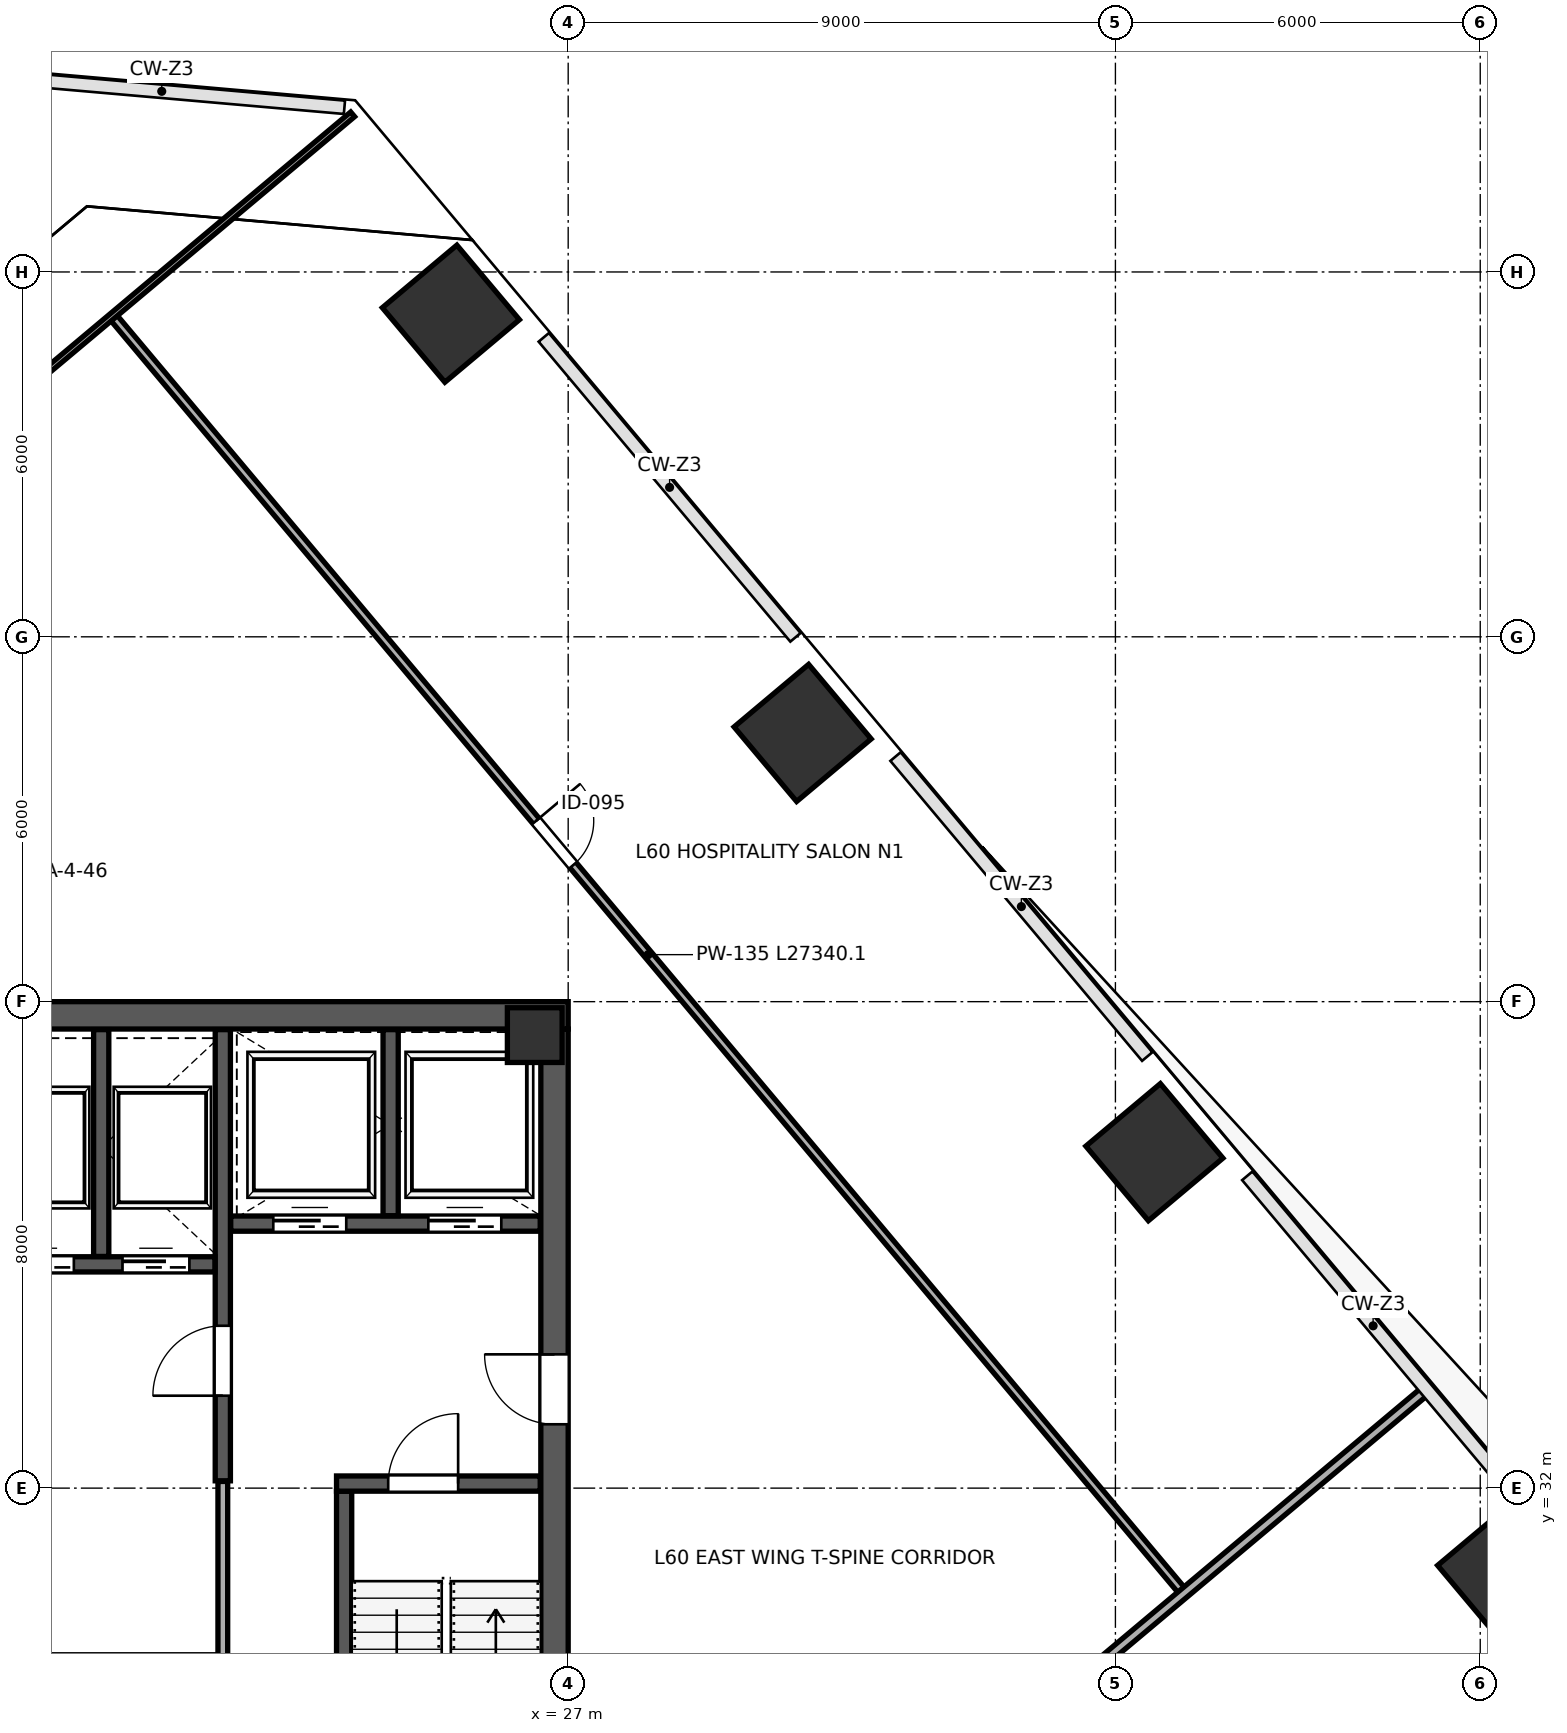
"""IFC4 building model, lengths in metres.
Left out: names, types, materials, properties, quantities, classifications, styles, units other than length and angle.
Written with IfcOpenShell. Run it as: python <this file> out.ifc"""

import sys

from ifc_helpers import new_model, si_unit, direction, frame, frame_2d, origin, origin_2d, place, context, subcontext, project, spatial, rectangle, extrude, source, transform, mapped, element, fill, save


model = new_model("IFC4")
c1 = context("Model", 3, precision=1e-05, world=origin(), true_north=direction((0.0, 1.0)))
c2 = subcontext(c1, "Body", "Model", "MODEL_VIEW")
j1 = project(units=[si_unit("LENGTHUNIT", "METRE"), si_unit("PLANEANGLEUNIT", "RADIAN")], contexts=[c1])
p1 = place(None, origin())
s1 = spatial("IfcSite", under=j1, at=p1, CompositionType="ELEMENT")
p2 = place(p1, origin())
s2 = spatial("IfcBuilding", under=s1, at=p2, CompositionType="ELEMENT")
p3 = place(p2, frame((0.0, 0.0, 266.8)))
s3 = spatial("IfcBuildingStorey", under=s2, at=p3, CompositionType="ELEMENT", Elevation=266.8)
m1 = source(origin(), c2, "Body", "SweptSolid", [
    extrude(rectangle(XDim=0.9, YDim=0.9, at=origin_2d()), origin(), (0.0, 0.0, 1.0), 4.198),
])
p4 = place(p3, frame((26.45, 39.45, 0.001), z_axis=(0.0, 0.0, 1.0), x_axis=(1.0, 0.0, 0.0)))
e1 = element("IfcColumn", 1, at=p4, inside=s3, PredefinedType="COLUMN", context=c2, shape_type="MappedRepresentation", body=[
    mapped(m1, transform((0.0, 0.0, 0.0), scale=1.0)),
])
m2 = source(origin(), c2, "Body", "SweptSolid", [
    extrude(rectangle(XDim=1.6, YDim=1.6, at=origin_2d()), origin(), (0.0, 0.0, 1.0), 4.198),
])
for number, where, z_axis, x_axis in (
    (2, (25.071, 51.314, 0.001), (0.0, 0.0, 1.0), (-0.643, 0.766, 0.0)),
    (3, (30.856, 44.419, 0.001), (0.0, 0.0, 1.0), (-0.643, 0.766, 0.0)),
    (4, (36.641, 37.525, 0.001), (0.0, 0.0, 1.0), (-0.643, 0.766, 0.0)),
    (5, (42.426, 30.631, 0.001), (0.0, 0.0, 1.0), (-0.643, 0.766, 0.0)),
):
    element("IfcColumn", number, at=place(p3, frame(where, z_axis=z_axis, x_axis=x_axis)), inside=s3, PredefinedType="COLUMN", context=c2, shape_type="MappedRepresentation", body=[
        mapped(m2, transform((0.0, 0.0, 0.0), scale=1.0)),
    ])
p5 = place(p3, frame((26.775, 24.45, 0.0), z_axis=(0.0, 0.0, 1.0), x_axis=(0.0, 1.0, 0.0)))
e6 = element("IfcWall", 6, at=p5, inside=s3, PredefinedType="SHEAR", context=c2, shape_type="SweptSolid", body=[
    extrude(rectangle(XDim=15.1, YDim=0.45, at=frame_2d((7.55, 0.0))), origin(), (0.0, 0.0, 1.0), 3.96),
])
p6 = place(p5, frame((8.6, 0.0, 0.0)))
e7 = element("IfcOpeningElement", 7, at=p6, cuts=e6, PredefinedType="OPENING", context=c2, shape_type="SweptSolid", body=[
    extrude(rectangle(XDim=1.15, YDim=2.2, at=frame_2d((0.575, 1.1))), frame((0.0, 0.235, 0.0), z_axis=(0.0, -1.0, 0.0), x_axis=(1.0, 0.0, 0.0)), (0.0, 0.0, 1.0), 0.47),
])
p7 = place(p3, frame((9.0, 39.775, 0.0), z_axis=(0.0, 0.0, 1.0), x_axis=(1.0, 0.0, 0.0)))
e8 = element("IfcWall", 8, at=p7, inside=s3, PredefinedType="SHEAR", context=c2, shape_type="SweptSolid", body=[
    extrude(rectangle(XDim=18.0, YDim=0.45, at=frame_2d((9.0, 0.0))), origin(), (0.0, 0.0, 1.0), 3.96),
])
p8 = place(p3, frame((23.315, 24.46, 0.0), z_axis=(0.0, 0.0, 1.0), x_axis=(0.0, 1.0, 0.0)))
e9 = element("IfcWall", 9, at=p8, inside=s3, PredefinedType="SHEAR", context=c2, shape_type="SweptSolid", body=[
    extrude(rectangle(XDim=7.49, YDim=0.25, at=frame_2d((3.745, 0.0))), origin(), (0.0, 0.0, 1.0), 3.96),
])
p9 = place(p3, frame((23.19, 32.075, 0.0), z_axis=(0.0, 0.0, 1.0), x_axis=(1.0, 0.0, 0.0)))
e10 = element("IfcWall", 10, at=p9, inside=s3, PredefinedType="SHEAR", context=c2, shape_type="SweptSolid", body=[
    extrude(rectangle(XDim=3.35, YDim=0.25, at=frame_2d((1.675, 0.0))), origin(), (0.0, 0.0, 1.0), 3.96),
])
p10 = place(p9, frame((0.85, 0.0, 0.0)))
e11 = element("IfcOpeningElement", 11, at=p10, cuts=e10, PredefinedType="OPENING", context=c2, shape_type="SweptSolid", body=[
    extrude(rectangle(XDim=1.15, YDim=2.2, at=frame_2d((0.575, 1.1))), frame((0.0, 0.135, 0.0), z_axis=(0.0, -1.0, 0.0), x_axis=(1.0, 0.0, 0.0)), (0.0, 0.0, 1.0), 0.27),
])
p11 = place(p3, frame((21.32, 32.12, 0.0), z_axis=(0.0, 0.0, 1.0), x_axis=(0.0, 1.0, 0.0)))
e12 = element("IfcWall", 12, at=p11, inside=s3, PredefinedType="SHEAR", context=c2, shape_type="SweptSolid", body=[
    extrude(rectangle(XDim=7.42, YDim=0.25, at=frame_2d((3.71, 0.0))), origin(), (0.0, 0.0, 1.0), 3.96),
])
p12 = place(p11, frame((1.4, 0.0, 0.0)))
e13 = element("IfcOpeningElement", 13, at=p12, cuts=e12, PredefinedType="OPENING", context=c2, shape_type="SweptSolid", body=[
    extrude(rectangle(XDim=1.15, YDim=2.2, at=frame_2d((0.575, 1.1))), frame((0.0, 0.135, 0.0), z_axis=(0.0, -1.0, 0.0), x_axis=(1.0, 0.0, 0.0)), (0.0, 0.0, 1.0), 0.27),
])
p13 = place(p3, frame((21.45, 36.35, 0.0), z_axis=(0.0, 0.0, 1.0), x_axis=(1.0, 0.0, 0.0)))
e14 = element("IfcWall", 14, at=p13, inside=s3, PredefinedType="SHEAR", context=c2, shape_type="SweptSolid", body=[
    extrude(rectangle(XDim=5.09, YDim=0.25, at=frame_2d((2.545, 0.0))), origin(), (0.0, 0.0, 1.0), 3.96),
])
p14 = place(p13, frame((0.7, 0.0, 0.0)))
e15 = element("IfcOpeningElement", 15, at=p14, cuts=e14, PredefinedType="OPENING", context=c2, shape_type="SweptSolid", body=[
    extrude(rectangle(XDim=1.2, YDim=2.2, at=frame_2d((0.6, 1.1))), frame((0.0, 0.135, 0.0), z_axis=(0.0, -1.0, 0.0), x_axis=(1.0, 0.0, 0.0)), (0.0, 0.0, 1.0), 0.27),
])
p15 = place(p13, frame((3.25, 0.0, 0.0)))
e16 = element("IfcOpeningElement", 16, at=p15, cuts=e14, PredefinedType="OPENING", context=c2, shape_type="SweptSolid", body=[
    extrude(rectangle(XDim=1.2, YDim=2.2, at=frame_2d((0.6, 1.1))), frame((0.0, 0.135, 0.0), z_axis=(0.0, -1.0, 0.0), x_axis=(1.0, 0.0, 0.0)), (0.0, 0.0, 1.0), 0.27),
])
p16 = place(p3, frame((24.08, 36.48, 0.0), z_axis=(0.0, 0.0, 1.0), x_axis=(0.0, 1.0, 0.0)))
e17 = element("IfcWall", 17, at=p16, inside=s3, PredefinedType="SHEAR", context=c2, shape_type="SweptSolid", body=[
    extrude(rectangle(XDim=3.06, YDim=0.25, at=frame_2d((1.53, 0.0))), origin(), (0.0, 0.0, 1.0), 3.96),
])
p17 = place(p3, frame((17.32, 35.68, 0.0), z_axis=(0.0, 0.0, 1.0), x_axis=(1.0, 0.0, 0.0)))
e18 = element("IfcWall", 18, at=p17, inside=s3, PredefinedType="SHEAR", context=c2, shape_type="SweptSolid", body=[
    extrude(rectangle(XDim=3.87, YDim=0.25, at=frame_2d((1.935, 0.0))), origin(), (0.0, 0.0, 1.0), 3.96),
])
p18 = place(p17, frame((0.45, 0.0, 0.0)))
e19 = element("IfcOpeningElement", 19, at=p18, cuts=e18, PredefinedType="OPENING", context=c2, shape_type="SweptSolid", body=[
    extrude(rectangle(XDim=1.1, YDim=2.2, at=frame_2d((0.55, 1.1))), frame((0.0, 0.135, 0.0), z_axis=(0.0, -1.0, 0.0), x_axis=(1.0, 0.0, 0.0)), (0.0, 0.0, 1.0), 0.27),
])
p19 = place(p17, frame((2.35, 0.0, 0.0)))
e20 = element("IfcOpeningElement", 20, at=p19, cuts=e18, PredefinedType="OPENING", context=c2, shape_type="SweptSolid", body=[
    extrude(rectangle(XDim=1.1, YDim=2.2, at=frame_2d((0.55, 1.1))), frame((0.0, 0.135, 0.0), z_axis=(0.0, -1.0, 0.0), x_axis=(1.0, 0.0, 0.0)), (0.0, 0.0, 1.0), 0.27),
])
p20 = place(p3, frame((19.32, 35.81, 0.0), z_axis=(0.0, 0.0, 1.0), x_axis=(0.0, 1.0, 0.0)))
e21 = element("IfcWall", 21, at=p20, inside=s3, PredefinedType="SHEAR", context=c2, shape_type="SweptSolid", body=[
    extrude(rectangle(XDim=3.73, YDim=0.25, at=frame_2d((1.865, 0.0))), origin(), (0.0, 0.0, 1.0), 3.96),
])
p21 = place(p3, frame((21.32, 29.19, 0.0), z_axis=(0.0, 0.0, 1.0), x_axis=(0.0, 1.0, 0.0)))
e22 = element("IfcWall", 22, at=p21, inside=s3, PredefinedType="PARTITIONING", context=c2, shape_type="SweptSolid", body=[
    extrude(rectangle(XDim=2.92, YDim=0.16, at=frame_2d((1.46, 0.0))), origin(), (0.0, 0.0, 1.0), 3.96),
])
p22 = place(p3, frame((19.528, 51.245, 0.0), z_axis=(0.0, 0.0, 1.0), x_axis=(0.642782364439, -0.766048844374, 0.0)))
e23 = element("IfcWall", 23, at=p22, inside=s3, PredefinedType="PARTITIONING", context=c2, shape_type="SweptSolid", body=[
    extrude(rectangle(XDim=27.34, YDim=0.135, at=frame_2d((13.67, 0.0))), origin(), (0.0, 0.0, 1.0), 3.96),
])
p23 = place(p22, frame((10.8, 0.0, 0.0)))
e24 = element("IfcOpeningElement", 24, at=p23, cuts=e23, PredefinedType="OPENING", context=c2, shape_type="SweptSolid", body=[
    extrude(rectangle(XDim=0.95, YDim=2.15, at=frame_2d((0.475, 1.075))), frame((0.0, 0.078, 0.0), z_axis=(0.0, -1.0, 0.0), x_axis=(1.0, 0.0, 0.0)), (0.0, 0.0, 1.0), 0.155),
])
p24 = place(p3, frame((0.849, 35.624, 0.0), z_axis=(0.0, 0.0, 1.0), x_axis=(0.766042777978, 0.642789594119, 0.0)))
e25 = element("IfcWall", 25, at=p24, inside=s3, PredefinedType="PARTITIONING", context=c2, shape_type="SweptSolid", body=[
    extrude(rectangle(XDim=29.51, YDim=0.1, at=frame_2d((14.755, 0.0))), origin(), (0.0, 0.0, 1.0), 3.96),
])
p25 = place(p24, frame((2.6, 0.0, 0.0)))
e26 = element("IfcOpeningElement", 26, at=p25, cuts=e25, PredefinedType="OPENING", context=c2, shape_type="SweptSolid", body=[
    extrude(rectangle(XDim=0.95, YDim=2.15, at=frame_2d((0.475, 1.075))), frame((0.0, 0.06, 0.0), z_axis=(0.0, -1.0, 0.0), x_axis=(1.0, 0.0, 0.0)), (0.0, 0.0, 1.0), 0.12),
])
p26 = place(p3, frame((25.576, 20.577, 0.0), z_axis=(0.0, 0.0, 1.0), x_axis=(0.76604764673, 0.642783791752, 0.0)))
e27 = element("IfcWall", 27, at=p26, inside=s3, PredefinedType="PARTITIONING", context=c2, shape_type="SweptSolid", body=[
    extrude(rectangle(XDim=20.24, YDim=0.16, at=frame_2d((10.12, 0.0))), origin(), (0.0, 0.0, 1.0), 3.195),
])
p27 = place(p3, frame((28.796, 16.74, 0.0), z_axis=(0.0, 0.0, 1.0), x_axis=(0.766036723368, 0.642796809616, 0.0)))
e28 = element("IfcWall", 28, at=p27, inside=s3, PredefinedType="PARTITIONING", context=c2, shape_type="SweptSolid", body=[
    extrude(rectangle(XDim=20.24, YDim=0.115, at=frame_2d((10.12, 0.0))), origin(), (0.0, 0.0, 1.0), 3.96),
])
m3 = source(origin(), c2, "Body", "SweptSolid", [
    extrude(rectangle(XDim=1.15, YDim=2.2, at=frame_2d((0.575, 1.1))), frame((0.0, 0.025, 0.0), z_axis=(0.0, -1.0, 0.0), x_axis=(1.0, 0.0, 0.0)), (0.0, 0.0, 1.0), 0.05),
])
p28 = place(p12, origin())
e29 = element("IfcDoor", 29, at=p28, inside=s3, OperationType="SINGLE_SWING_LEFT", PredefinedType="DOOR", context=c2, shape_type="MappedRepresentation", body=[
    mapped(m3, transform((0.0, 0.0, 0.0), scale=1.0)),
])
fill(e13, e29)
m4 = source(origin(), c2, "Body", "SweptSolid", [
    extrude(rectangle(XDim=1.15, YDim=2.2, at=frame_2d((0.575, 1.1))), frame((0.0, 0.025, 0.0), z_axis=(0.0, -1.0, 0.0), x_axis=(1.0, 0.0, 0.0)), (0.0, 0.0, 1.0), 0.05),
])
p29 = place(p10, origin())
e30 = element("IfcDoor", 30, at=p29, inside=s3, OperationType="SINGLE_SWING_RIGHT", PredefinedType="DOOR", context=c2, shape_type="MappedRepresentation", body=[
    mapped(m4, transform((0.0, 0.0, 0.0), scale=1.0)),
])
fill(e11, e30)
p30 = place(p6, origin())
e31 = element("IfcDoor", 31, at=p30, inside=s3, OperationType="SINGLE_SWING_RIGHT", PredefinedType="DOOR", context=c2, shape_type="MappedRepresentation", body=[
    mapped(m3, transform((0.0, 0.0, 0.0), scale=1.0)),
])
fill(e7, e31)
m5 = source(origin(), c2, "Body", "SweptSolid", [
    extrude(rectangle(XDim=1.1, YDim=2.2, at=frame_2d((0.55, 1.1))), frame((0.0, 0.025, 0.0), z_axis=(0.0, -1.0, 0.0), x_axis=(1.0, 0.0, 0.0)), (0.0, 0.0, 1.0), 0.05),
])
p31 = place(p18, origin())
e32 = element("IfcDoor", 32, at=p31, inside=s3, OperationType="SLIDING_TO_LEFT", PredefinedType="DOOR", context=c2, shape_type="MappedRepresentation", body=[
    mapped(m5, transform((0.0, 0.0, 0.0), scale=1.0)),
])
fill(e19, e32)
p32 = place(p19, origin())
e33 = element("IfcDoor", 33, at=p32, inside=s3, OperationType="SLIDING_TO_RIGHT", PredefinedType="DOOR", context=c2, shape_type="MappedRepresentation", body=[
    mapped(m5, transform((0.0, 0.0, 0.0), scale=1.0)),
])
fill(e20, e33)
m6 = source(origin(), c2, "Body", "SweptSolid", [
    extrude(rectangle(XDim=1.2, YDim=2.2, at=frame_2d((0.6, 1.1))), frame((0.0, 0.025, 0.0), z_axis=(0.0, -1.0, 0.0), x_axis=(1.0, 0.0, 0.0)), (0.0, 0.0, 1.0), 0.05),
])
p33 = place(p14, origin())
e34 = element("IfcDoor", 34, at=p33, inside=s3, OperationType="SLIDING_TO_LEFT", PredefinedType="DOOR", context=c2, shape_type="MappedRepresentation", body=[
    mapped(m6, transform((0.0, 0.0, 0.0), scale=1.0)),
])
fill(e15, e34)
p34 = place(p15, origin())
e35 = element("IfcDoor", 35, at=p34, inside=s3, OperationType="SLIDING_TO_RIGHT", PredefinedType="DOOR", context=c2, shape_type="MappedRepresentation", body=[
    mapped(m6, transform((0.0, 0.0, 0.0), scale=1.0)),
])
fill(e16, e35)
m7 = source(origin(), c2, "Body", "SweptSolid", [
    extrude(rectangle(XDim=0.95, YDim=2.15, at=frame_2d((0.475, 1.075))), frame((0.0, 0.025, 0.0), z_axis=(0.0, -1.0, 0.0), x_axis=(1.0, 0.0, 0.0)), (0.0, 0.0, 1.0), 0.05),
])
p35 = place(p23, origin())
e36 = element("IfcDoor", 36, at=p35, inside=s3, OperationType="SINGLE_SWING_LEFT", PredefinedType="DOOR", context=c2, shape_type="MappedRepresentation", body=[
    mapped(m7, transform((0.0, 0.0, 0.0), scale=1.0)),
])
fill(e24, e36)
save(model, sys.argv[1])
